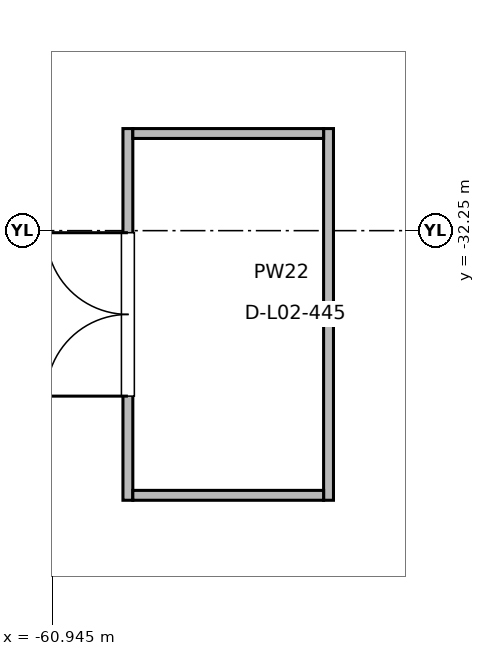
"""IFC4 building model, lengths in metres.
Left out: names, types, materials, properties, quantities, classifications, styles, units other than length and angle.
Written with IfcOpenShell. Run it as: python <this file> out.ifc"""

import sys

from ifc_helpers import new_model, si_unit, direction, frame, frame_2d, origin, place, context, subcontext, project, spatial, rectangle, extrude, element, fill, save


model = new_model("IFC4")
c1 = context("Model", 3, precision=1e-05, world=origin(), true_north=direction((0.0, 1.0)))
c2 = subcontext(c1, "Body", "Model", "MODEL_VIEW")
j1 = project(units=[si_unit("LENGTHUNIT", "METRE"), si_unit("PLANEANGLEUNIT", "RADIAN")], contexts=[c1])
p1 = place(None, origin())
s1 = spatial("IfcSite", under=j1, at=p1, CompositionType="ELEMENT")
p2 = place(p1, origin())
s2 = spatial("IfcBuilding", under=s1, at=p2, CompositionType="ELEMENT")
p3 = place(p2, frame((0.0, 0.0, 6.0)))
s3 = spatial("IfcBuildingStorey", under=s2, at=p3, CompositionType="ELEMENT", Elevation=6.0)
p4 = place(p3, frame((-59.949, -35.797, 0.0), z_axis=(0.0, 0.0, 1.0), x_axis=(0.0, 1.0, 0.0)))
e1 = element("IfcWall", 1, at=p4, inside=s3, PredefinedType="PARTITIONING", context=c2, shape_type="SweptSolid", body=[
    extrude(rectangle(XDim=4.89, YDim=0.13, at=frame_2d((2.445, 0.0))), origin(), (0.0, 0.0, 1.0), 4.42),
])
p5 = place(p4, frame((1.37, 0.0, 0.0)))
e2 = element("IfcOpeningElement", 2, at=p5, cuts=e1, PredefinedType="OPENING", context=c2, shape_type="SweptSolid", body=[
    extrude(rectangle(XDim=2.15, YDim=2.45, at=frame_2d((1.075, 1.225))), frame((0.0, 0.075, 0.0), z_axis=(0.0, -1.0, 0.0), x_axis=(1.0, 0.0, 0.0)), (0.0, 0.0, 1.0), 0.15),
])
p6 = place(p3, frame((-57.309, -35.797, 0.0), z_axis=(0.0, 0.0, 1.0), x_axis=(0.0, 1.0, 0.0)))
e3 = element("IfcWall", 3, at=p6, inside=s3, PredefinedType="PARTITIONING", context=c2, shape_type="SweptSolid", body=[
    extrude(rectangle(XDim=4.89, YDim=0.13, at=frame_2d((2.445, 0.0))), origin(), (0.0, 0.0, 1.0), 4.42),
])
for number, where, z_axis, x_axis in (
    (4, (-59.884, -35.732, 0.0), (0.0, 0.0, 1.0), (1.0, 0.0, 0.0)),
    (5, (-59.884, -30.972, 0.0), (0.0, 0.0, 1.0), (1.0, 0.0, 0.0)),
):
    element("IfcWall", number, at=place(p3, frame(where, z_axis=z_axis, x_axis=x_axis)), inside=s3, PredefinedType="PARTITIONING", context=c2, shape_type="SweptSolid", body=[
        extrude(rectangle(XDim=2.51, YDim=0.13, at=frame_2d((1.255, 0.0))), origin(), (0.0, 0.0, 1.0), 4.42),
    ])
p7 = place(p5, origin())
e6 = element("IfcDoor", 6, at=p7, inside=s3, OperationType="DOUBLE_DOOR_SINGLE_SWING", PredefinedType="DOOR", context=c2, shape_type="SweptSolid", body=[
    extrude(rectangle(XDim=2.15, YDim=2.45, at=frame_2d((1.075, 1.225))), frame((0.0, 0.025, 0.0), z_axis=(0.0, -1.0, 0.0), x_axis=(1.0, 0.0, 0.0)), (0.0, 0.0, 1.0), 0.05),
])
fill(e2, e6)
save(model, sys.argv[1])
